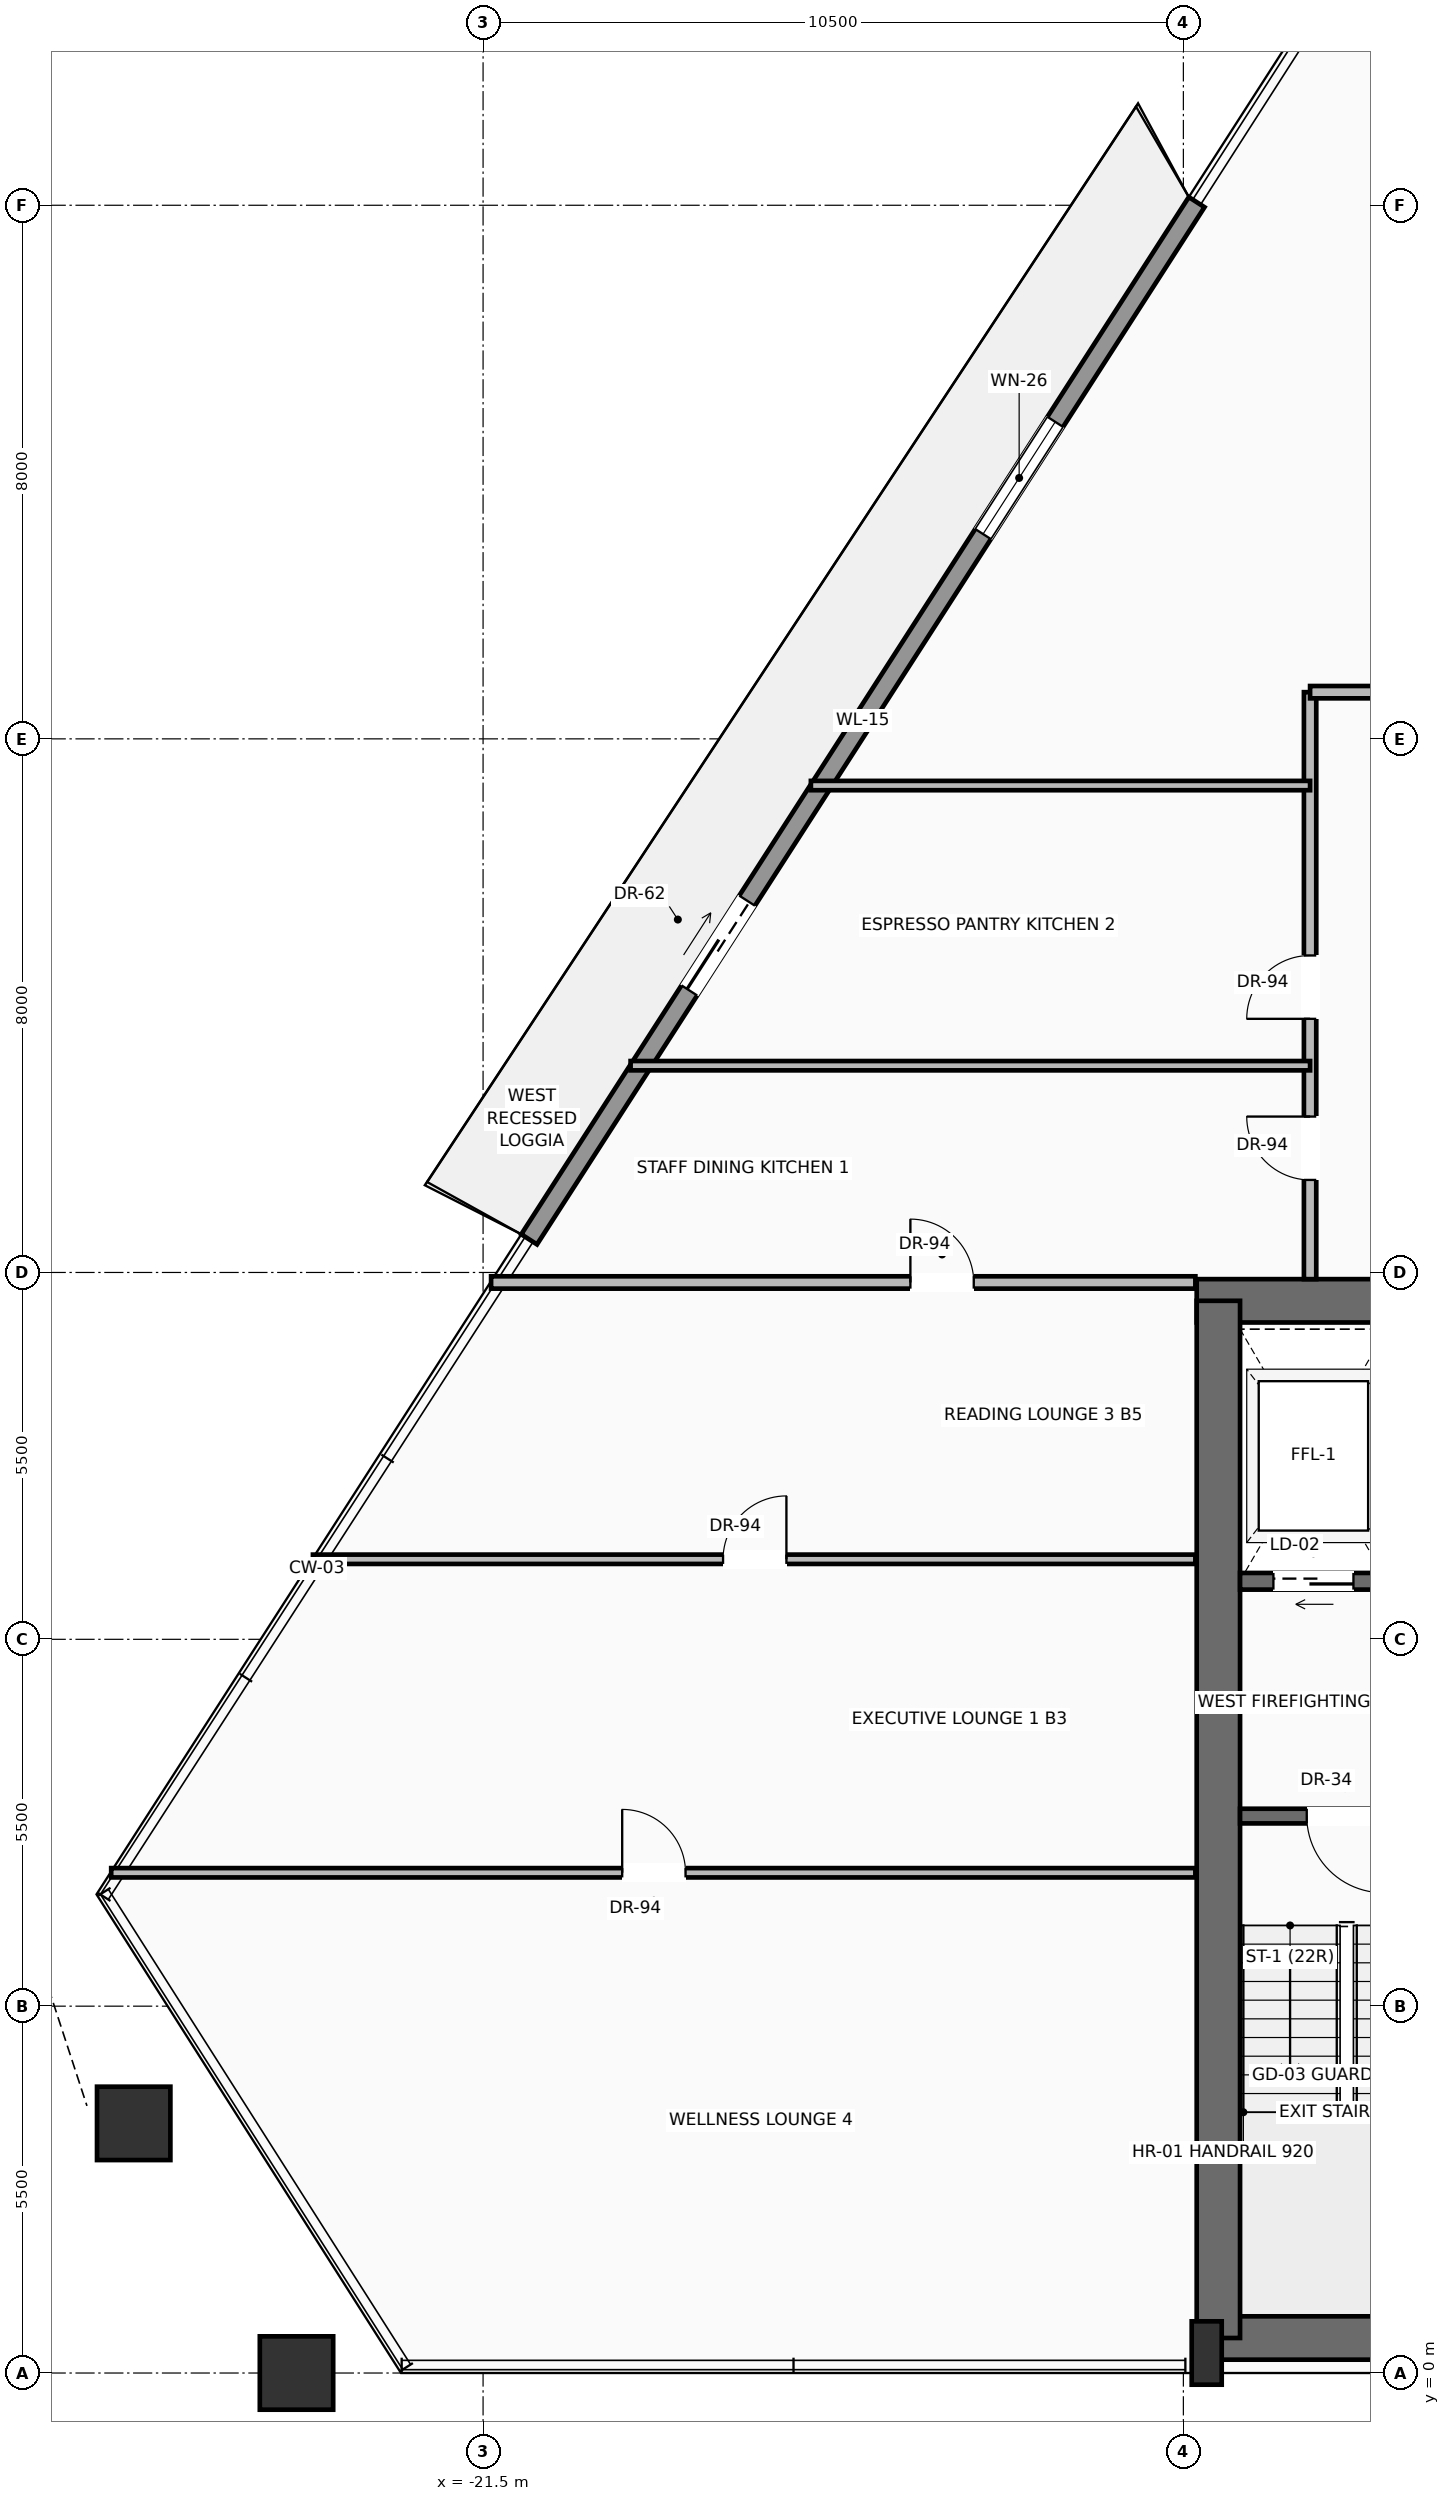
"""IFC4 building model, lengths in metres.
Left out: names, types, materials, properties, quantities, classifications, styles, units other than length and angle.
Written with IfcOpenShell. Run it as: python <this file> out.ifc"""

import sys

from ifc_helpers import new_model, si_unit, direction, frame, frame_2d, origin, origin_2d, place, context, subcontext, project, spatial, rectangle, hollow_rectangle, extrude, source, transform, mapped, element, fill, save


model = new_model("IFC4")
c1 = context("Model", 3, precision=1e-05, world=origin(), true_north=direction((0.0, 1.0)))
c2 = subcontext(c1, "Body", "Model", "MODEL_VIEW")
j1 = project(units=[si_unit("LENGTHUNIT", "METRE"), si_unit("PLANEANGLEUNIT", "RADIAN")], contexts=[c1])
p1 = place(None, origin())
s1 = spatial("IfcSite", under=j1, at=p1, CompositionType="ELEMENT")
p2 = place(p1, origin())
s2 = spatial("IfcBuilding", under=s1, at=p2, CompositionType="ELEMENT")
p3 = place(p2, frame((0.0, 0.0, 151.5)))
s3 = spatial("IfcBuildingStorey", under=s2, at=p3, CompositionType="ELEMENT", Elevation=151.5)
p4 = place(p3, frame((-10.65, 0.525, 0.0), z_axis=(0.0, 0.0, 1.0), x_axis=(1.0, 0.0, 0.0)))
e1 = element("IfcWall", 1, at=p4, inside=s3, PredefinedType="SHEAR", context=c2, shape_type="SweptSolid", body=[
    extrude(rectangle(XDim=21.3, YDim=0.65, at=frame_2d((10.65, 0.0))), origin(), (0.0, 0.0, 1.0), 3.47),
])
p5 = place(p3, frame((-10.8, 16.075, 0.0), z_axis=(0.0, 0.0, 1.0), x_axis=(1.0, 0.0, 0.0)))
e2 = element("IfcWall", 2, at=p5, inside=s3, PredefinedType="SHEAR", context=c2, shape_type="SweptSolid", body=[
    extrude(rectangle(XDim=21.6, YDim=0.65, at=frame_2d((10.8, 0.0))), origin(), (0.0, 0.0, 1.0), 3.47),
])
p6 = place(p5, frame((3.37, 0.0, 0.0)))
e3 = element("IfcOpeningElement", 3, at=p6, cuts=e2, PredefinedType="OPENING", context=c2, shape_type="SweptSolid", body=[
    extrude(rectangle(XDim=1.3, YDim=2.3, at=frame_2d((0.65, 1.15))), frame((0.0, 0.335, 0.0), z_axis=(0.0, -1.0, 0.0), x_axis=(1.0, 0.0, 0.0)), (0.0, 0.0, 1.0), 0.67),
])
p7 = place(p5, frame((9.8, 0.0, 0.0)))
e4 = element("IfcOpeningElement", 4, at=p7, cuts=e2, PredefinedType="OPENING", context=c2, shape_type="SweptSolid", body=[
    extrude(rectangle(XDim=2.0, YDim=2.4, at=frame_2d((1.0, 1.2))), frame((0.0, 0.335, 0.0), z_axis=(0.0, -1.0, 0.0), x_axis=(1.0, 0.0, 0.0)), (0.0, 0.0, 1.0), 0.67),
])
p8 = place(p3, frame((-10.475, 0.525, 0.0), z_axis=(0.0, 0.0, 1.0), x_axis=(0.0, 1.0, 0.0)))
e5 = element("IfcWall", 5, at=p8, inside=s3, PredefinedType="SHEAR", context=c2, shape_type="SweptSolid", body=[
    extrude(rectangle(XDim=15.55, YDim=0.65, at=frame_2d((7.775, 0.0))), origin(), (0.0, 0.0, 1.0), 3.47),
])
m1 = source(origin(), c2, "Body", "SweptSolid", [
    extrude(rectangle(XDim=0.45, YDim=0.95, at=origin_2d()), origin(), (0.0, 0.0, 1.0), 3.7),
])
p9 = place(p3, frame((-10.65, 0.3, 0.0), z_axis=(0.0, 0.0, 1.0), x_axis=(1.0, 0.0, 0.0)))
e6 = element("IfcColumn", 6, at=p9, inside=s3, PredefinedType="PILASTER", context=c2, shape_type="MappedRepresentation", body=[
    mapped(m1, transform((0.0, 0.0, 0.0), scale=1.0)),
])
m2 = source(origin(), c2, "Body", "SweptSolid", [
    extrude(hollow_rectangle(XDim=1.1, YDim=1.1, WallThickness=0.055, at=origin_2d()), origin(), (0.0, 0.0, 1.0), 3.691),
])
p10 = place(p3, frame((-24.297, 0.0, 0.004), z_axis=(-0.00992080284, 0.0, 0.999950787625), x_axis=(0.0, -1.0, 0.0)))
e7 = element("IfcColumn", 7, at=p10, inside=s3, PredefinedType="COLUMN", context=c2, shape_type="MappedRepresentation", body=[
    mapped(m2, transform((0.0, 0.0, 0.0), scale=1.0)),
])
m3 = source(origin(), c2, "Body", "SweptSolid", [
    extrude(hollow_rectangle(XDim=1.1, YDim=1.1, WallThickness=0.055, at=origin_2d()), origin(), (0.0, 0.0, 1.0), 3.692),
])
p11 = place(p3, frame((-26.739, 3.743, 0.004), z_axis=(0.000793601382, -0.016004294541, 0.999871608134), x_axis=(0.998772838371, 0.04952592587, 0.0)))
e8 = element("IfcColumn", 8, at=p11, inside=s3, PredefinedType="COLUMN", context=c2, shape_type="MappedRepresentation", body=[
    mapped(m3, transform((0.0, 0.0, 0.0), scale=1.0)),
])
p12 = place(p3, frame((-20.809, 16.996, 0.0), z_axis=(0.0, 0.0, 1.0), x_axis=(0.541198565195, 0.840894828757, 0.0)))
e9 = element("IfcWall", 9, at=p12, inside=s3, PredefinedType="SOLIDWALL", context=c2, shape_type="SweptSolid", body=[
    extrude(rectangle(XDim=18.493, YDim=0.28, at=frame_2d((9.247, 0.0))), origin(), (0.0, 0.0, 1.0), 3.05),
])
p13 = place(p12, frame((4.438, 0.0, 0.0)))
e10 = element("IfcOpeningElement", 10, at=p13, cuts=e9, PredefinedType="OPENING", context=c2, shape_type="SweptSolid", body=[
    extrude(rectangle(XDim=1.6, YDim=2.35, at=frame_2d((0.8, 1.175))), frame((0.0, 0.15, 0.0), z_axis=(0.0, -1.0, 0.0), x_axis=(1.0, 0.0, 0.0)), (0.0, 0.0, 1.0), 0.3),
])
p14 = place(p12, frame((12.575, 0.0, 0.9)))
e11 = element("IfcOpeningElement", 11, at=p14, cuts=e9, PredefinedType="OPENING", context=c2, shape_type="SweptSolid", body=[
    extrude(rectangle(XDim=2.0, YDim=1.85, at=frame_2d((1.0, 0.925))), frame((0.0, 0.15, 0.0), z_axis=(0.0, -1.0, 0.0), x_axis=(1.0, 0.0, 0.0)), (0.0, 0.0, 1.0), 0.3),
])
p15 = place(p3, frame((-5.5, 8.35, 0.0), z_axis=(0.0, 0.0, 1.0), x_axis=(-1.0, 0.0, 0.0)))
e12 = element("IfcWall", 12, at=p15, inside=s3, PredefinedType="SOLIDWALL", context=c2, shape_type="SweptSolid", body=[
    extrude(rectangle(XDim=4.65, YDim=0.22, at=frame_2d((2.325, 0.0))), origin(), (0.0, 0.0, 1.0), 3.47),
])
p16 = place(p15, frame((2.5, 0.0, 0.0)))
e13 = element("IfcOpeningElement", 13, at=p16, cuts=e12, PredefinedType="OPENING", context=c2, shape_type="SweptSolid", body=[
    extrude(rectangle(XDim=1.15, YDim=2.2, at=frame_2d((0.575, 1.1))), frame((0.0, 0.12, 0.0), z_axis=(0.0, -1.0, 0.0), x_axis=(1.0, 0.0, 0.0)), (0.0, 0.0, 1.0), 0.24),
])
p17 = place(p3, frame((-5.5, 11.87, 0.0), z_axis=(0.0, 0.0, 1.0), x_axis=(-1.0, 0.0, 0.0)))
e14 = element("IfcWall", 14, at=p17, inside=s3, PredefinedType="SOLIDWALL", context=c2, shape_type="SweptSolid", body=[
    extrude(rectangle(XDim=4.65, YDim=0.25, at=frame_2d((2.325, 0.0))), origin(), (0.0, 0.0, 1.0), 3.47),
])
p18 = place(p17, frame((2.95, 0.0, 0.0)))
e15 = element("IfcOpeningElement", 15, at=p18, cuts=e14, PredefinedType="OPENING", context=c2, shape_type="SweptSolid", body=[
    extrude(rectangle(XDim=1.2, YDim=2.25, at=frame_2d((0.6, 1.125))), frame((0.0, 0.135, 0.0), z_axis=(0.0, -1.0, 0.0), x_axis=(1.0, 0.0, 0.0)), (0.0, 0.0, 1.0), 0.27),
])
p19 = place(p3, frame((-9.1, 16.4, 0.0), z_axis=(0.0, 0.0, 1.0), x_axis=(0.0, 1.0, 0.0)))
e16 = element("IfcWall", 16, at=p19, inside=s3, PredefinedType="PARTITIONING", context=c2, shape_type="SweptSolid", body=[
    extrude(rectangle(XDim=8.8, YDim=0.185, at=frame_2d((4.4, 0.0))), origin(), (0.0, 0.0, 1.0), 2.846),
])
p20 = place(p19, frame((3.903, 0.0, 0.0)))
e17 = element("IfcOpeningElement", 17, at=p20, cuts=e16, PredefinedType="OPENING", context=c2, shape_type="SweptSolid", body=[
    extrude(rectangle(XDim=0.95, YDim=2.2, at=frame_2d((0.475, 1.1))), frame((0.0, 0.103, 0.0), z_axis=(0.0, -1.0, 0.0), x_axis=(1.0, 0.0, 0.0)), (0.0, 0.0, 1.0), 0.205),
])
p21 = place(p19, frame((1.487, 0.0, 0.0)))
e18 = element("IfcOpeningElement", 18, at=p21, cuts=e16, PredefinedType="OPENING", context=c2, shape_type="SweptSolid", body=[
    extrude(rectangle(XDim=0.95, YDim=2.2, at=frame_2d((0.475, 1.1))), frame((0.0, 0.103, 0.0), z_axis=(0.0, -1.0, 0.0), x_axis=(1.0, 0.0, 0.0)), (0.0, 0.0, 1.0), 0.205),
])
p22 = place(p3, frame((-9.1, 25.2, 0.0), z_axis=(0.0, 0.0, 1.0), x_axis=(1.0, 0.0, 0.0)))
e19 = element("IfcWall", 19, at=p22, inside=s3, PredefinedType="PARTITIONING", context=c2, shape_type="SweptSolid", body=[
    extrude(rectangle(XDim=2.2, YDim=0.185, at=frame_2d((1.1, 0.0))), origin(), (0.0, 0.0, 1.0), 3.462),
])
p23 = place(p3, frame((-21.38, 16.35, 0.0), z_axis=(0.0, 0.0, 1.0), x_axis=(1.0, 0.0, 0.0)))
e20 = element("IfcWall", 20, at=p23, inside=s3, PredefinedType="PARTITIONING", context=c2, shape_type="SweptSolid", body=[
    extrude(rectangle(XDim=10.56, YDim=0.185, at=frame_2d((5.28, 0.0))), origin(), (0.0, 0.0, 1.0), 3.462),
])
p24 = place(p23, frame((6.287, 0.0, 0.0)))
e21 = element("IfcOpeningElement", 21, at=p24, cuts=e20, PredefinedType="OPENING", context=c2, shape_type="SweptSolid", body=[
    extrude(rectangle(XDim=0.95, YDim=2.2, at=frame_2d((0.475, 1.1))), frame((0.0, 0.103, 0.0), z_axis=(0.0, -1.0, 0.0), x_axis=(1.0, 0.0, 0.0)), (0.0, 0.0, 1.0), 0.205),
])
p25 = place(p3, frame((-27.076, 7.5, 0.0), z_axis=(0.0, 0.0, 1.0), x_axis=(1.0, 0.0, 0.0)))
e22 = element("IfcWall", 22, at=p25, inside=s3, PredefinedType="PARTITIONING", context=c2, shape_type="SweptSolid", body=[
    extrude(rectangle(XDim=16.256, YDim=0.14, at=frame_2d((8.128, 0.0))), origin(), (0.0, 0.0, 1.0), 3.462),
])
p26 = place(p25, frame((7.662, 0.0, 0.0)))
e23 = element("IfcOpeningElement", 23, at=p26, cuts=e22, PredefinedType="OPENING", context=c2, shape_type="SweptSolid", body=[
    extrude(rectangle(XDim=0.95, YDim=2.2, at=frame_2d((0.475, 1.1))), frame((0.0, 0.08, 0.0), z_axis=(0.0, -1.0, 0.0), x_axis=(1.0, 0.0, 0.0)), (0.0, 0.0, 1.0), 0.16),
])
p27 = place(p3, frame((-24.051, 12.2, 0.0), z_axis=(0.0, 0.0, 1.0), x_axis=(1.0, 0.0, 0.0)))
e24 = element("IfcWall", 24, at=p27, inside=s3, PredefinedType="PARTITIONING", context=c2, shape_type="SweptSolid", body=[
    extrude(rectangle(XDim=13.231, YDim=0.14, at=frame_2d((6.615, 0.0))), origin(), (0.0, 0.0, 1.0), 3.462),
])
p28 = place(p27, frame((6.149, 0.0, 0.0)))
e25 = element("IfcOpeningElement", 25, at=p28, cuts=e24, PredefinedType="OPENING", context=c2, shape_type="SweptSolid", body=[
    extrude(rectangle(XDim=0.95, YDim=2.2, at=frame_2d((0.475, 1.1))), frame((0.0, 0.08, 0.0), z_axis=(0.0, -1.0, 0.0), x_axis=(1.0, 0.0, 0.0)), (0.0, 0.0, 1.0), 0.16),
])
p29 = place(p3, frame((-19.288, 19.6, 0.0), z_axis=(0.0, 0.0, 1.0), x_axis=(1.0, 0.0, 0.0)))
e26 = element("IfcWall", 26, at=p29, inside=s3, PredefinedType="PARTITIONING", context=c2, shape_type="SweptSolid", body=[
    extrude(rectangle(XDim=10.188, YDim=0.14, at=frame_2d((5.094, 0.0))), origin(), (0.0, 0.0, 1.0), 3.049),
])
p30 = place(p3, frame((-16.585, 23.8, 0.0), z_axis=(0.0, 0.0, 1.0), x_axis=(1.0, 0.0, 0.0)))
e27 = element("IfcWall", 27, at=p30, inside=s3, PredefinedType="PARTITIONING", context=c2, shape_type="SweptSolid", body=[
    extrude(rectangle(XDim=7.485, YDim=0.14, at=frame_2d((3.742, 0.0))), origin(), (0.0, 0.0, 1.0), 3.462),
])
m4 = source(origin(), c2, "Body", "SweptSolid", [
    extrude(rectangle(XDim=1.6, YDim=2.35, at=frame_2d((0.8, 1.175))), frame((0.0, 0.025, 0.0), z_axis=(0.0, -1.0, 0.0), x_axis=(1.0, 0.0, 0.0)), (0.0, 0.0, 1.0), 0.05),
])
p31 = place(p13, origin())
e28 = element("IfcDoor", 28, at=p31, inside=s3, OperationType="SLIDING_TO_LEFT", PredefinedType="DOOR", context=c2, shape_type="MappedRepresentation", body=[
    mapped(m4, transform((0.0, 0.0, 0.0), scale=1.0)),
])
fill(e10, e28)
m5 = source(origin(), c2, "Body", "SweptSolid", [
    extrude(rectangle(XDim=2.0, YDim=1.85, at=frame_2d((1.0, 0.925))), frame((0.0, 0.03, 0.0), z_axis=(0.0, -1.0, 0.0), x_axis=(1.0, 0.0, 0.0)), (0.0, 0.0, 1.0), 0.06),
])
p32 = place(p14, origin())
e29 = element("IfcWindow", 29, at=p32, inside=s3, PartitioningType="SINGLE_PANEL", PredefinedType="WINDOW", context=c2, shape_type="MappedRepresentation", body=[
    mapped(m5, transform((0.0, 0.0, 0.0), scale=1.0)),
])
fill(e11, e29)
m6 = source(origin(), c2, "Body", "SweptSolid", [
    extrude(rectangle(XDim=1.15, YDim=2.2, at=frame_2d((0.575, 1.1))), frame((0.0, 0.025, 0.0), z_axis=(0.0, -1.0, 0.0), x_axis=(1.0, 0.0, 0.0)), (0.0, 0.0, 1.0), 0.05),
])
p33 = place(p16, origin())
e30 = element("IfcDoor", 30, at=p33, inside=s3, OperationType="SINGLE_SWING_LEFT", PredefinedType="DOOR", context=c2, shape_type="MappedRepresentation", body=[
    mapped(m6, transform((0.0, 0.0, 0.0), scale=1.0)),
])
fill(e13, e30)
m7 = source(origin(), c2, "Body", "SweptSolid", [
    extrude(rectangle(XDim=1.2, YDim=2.25, at=frame_2d((0.6, 1.125))), frame((0.0, 0.025, 0.0), z_axis=(0.0, -1.0, 0.0), x_axis=(1.0, 0.0, 0.0)), (0.0, 0.0, 1.0), 0.05),
])
p34 = place(p18, origin())
e31 = element("IfcDoor", 31, at=p34, inside=s3, OperationType="SLIDING_TO_LEFT", PredefinedType="DOOR", context=c2, shape_type="MappedRepresentation", body=[
    mapped(m7, transform((0.0, 0.0, 0.0), scale=1.0)),
])
fill(e15, e31)
m8 = source(origin(), c2, "Body", "SweptSolid", [
    extrude(rectangle(XDim=0.95, YDim=2.2, at=frame_2d((0.475, 1.1))), frame((0.0, 0.025, 0.0), z_axis=(0.0, -1.0, 0.0), x_axis=(1.0, 0.0, 0.0)), (0.0, 0.0, 1.0), 0.05),
])
p35 = place(p20, origin())
e32 = element("IfcDoor", 32, at=p35, inside=s3, OperationType="SINGLE_SWING_LEFT", PredefinedType="DOOR", context=c2, shape_type="MappedRepresentation", body=[
    mapped(m8, transform((0.0, 0.0, 0.0), scale=1.0)),
])
fill(e17, e32)
p36 = place(p24, origin())
e33 = element("IfcDoor", 33, at=p36, inside=s3, OperationType="SINGLE_SWING_LEFT", PredefinedType="DOOR", context=c2, shape_type="MappedRepresentation", body=[
    mapped(m8, transform((0.0, 0.0, 0.0), scale=1.0)),
])
fill(e21, e33)
p37 = place(p21, origin())
e34 = element("IfcDoor", 34, at=p37, inside=s3, OperationType="SINGLE_SWING_RIGHT", PredefinedType="DOOR", context=c2, shape_type="MappedRepresentation", body=[
    mapped(m8, transform((0.0, 0.0, 0.0), scale=1.0)),
])
fill(e18, e34)
p38 = place(p28, origin())
e35 = element("IfcDoor", 35, at=p38, inside=s3, OperationType="SINGLE_SWING_RIGHT", PredefinedType="DOOR", context=c2, shape_type="MappedRepresentation", body=[
    mapped(m8, transform((0.0, 0.0, 0.0), scale=1.0)),
])
fill(e25, e35)
p39 = place(p26, origin())
e36 = element("IfcDoor", 36, at=p39, inside=s3, OperationType="SINGLE_SWING_LEFT", PredefinedType="DOOR", context=c2, shape_type="MappedRepresentation", body=[
    mapped(m8, transform((0.0, 0.0, 0.0), scale=1.0)),
])
fill(e23, e36)
save(model, sys.argv[1])
